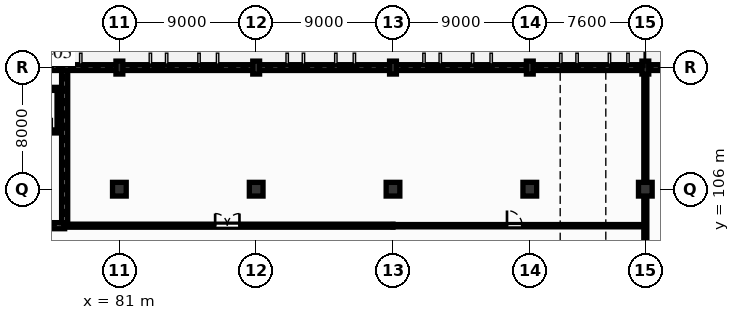
"""IFC4 building model, lengths in metres.
Left out: names, types, materials, properties, quantities, classifications, styles, units other than length and angle.
Written with IfcOpenShell. Run it as: python <this file> out.ifc"""

import sys

from ifc_helpers import new_model, si_unit, direction, frame, frame_2d, origin, origin_2d, place, context, subcontext, project, spatial, rectangle, extrude, element, fill, save


model = new_model("IFC4")
c1 = context("Model", 3, precision=1e-05, world=origin(), true_north=direction((0.0, 1.0)))
c2 = subcontext(c1, "Body", "Model", "MODEL_VIEW")
j1 = project(units=[si_unit("LENGTHUNIT", "METRE"), si_unit("PLANEANGLEUNIT", "RADIAN")], contexts=[c1])
p1 = place(None, origin())
s1 = spatial("IfcSite", under=j1, at=p1, CompositionType="ELEMENT")
p2 = place(p1, origin())
s2 = spatial("IfcBuilding", under=s1, at=p2, CompositionType="ELEMENT")
p3 = place(p2, origin())
s3 = spatial("IfcBuildingStorey", under=s2, at=p3, CompositionType="ELEMENT", Elevation=0.0)
p4 = place(p3, frame((81.0, 106.0, 0.0), z_axis=(0.0, 0.0, 1.0), x_axis=(1.0, 0.0, 0.0)))
e1 = element("IfcColumn", 1, at=p4, inside=s3, PredefinedType="COLUMN", context=c2, shape_type="SweptSolid", body=[
    extrude(rectangle(XDim=0.9, YDim=0.9, at=origin_2d()), origin(), (0.0, 0.0, 1.0), 5.1),
])
p5 = place(p3, frame((81.0, 114.0, 0.0), z_axis=(0.0, 0.0, 1.0), x_axis=(0.0, 1.0, 0.0)))
e2 = element("IfcColumn", 2, at=p5, inside=s3, PredefinedType="COLUMN", context=c2, shape_type="SweptSolid", body=[
    extrude(rectangle(XDim=0.45, YDim=0.85, at=origin_2d()), origin(), (0.0, 0.0, 1.0), 5.1),
])
p6 = place(p3, frame((90.0, 106.0, 0.0), z_axis=(0.0, 0.0, 1.0), x_axis=(1.0, 0.0, 0.0)))
e3 = element("IfcColumn", 3, at=p6, inside=s3, PredefinedType="COLUMN", context=c2, shape_type="SweptSolid", body=[
    extrude(rectangle(XDim=0.9, YDim=0.9, at=origin_2d()), origin(), (0.0, 0.0, 1.0), 5.1),
])
p7 = place(p3, frame((90.0, 114.0, 0.0), z_axis=(0.0, 0.0, 1.0), x_axis=(0.0, 1.0, 0.0)))
e4 = element("IfcColumn", 4, at=p7, inside=s3, PredefinedType="COLUMN", context=c2, shape_type="SweptSolid", body=[
    extrude(rectangle(XDim=0.45, YDim=0.85, at=origin_2d()), origin(), (0.0, 0.0, 1.0), 5.1),
])
p8 = place(p3, frame((99.0, 106.0, 0.0), z_axis=(0.0, 0.0, 1.0), x_axis=(1.0, 0.0, 0.0)))
e5 = element("IfcColumn", 5, at=p8, inside=s3, PredefinedType="COLUMN", context=c2, shape_type="SweptSolid", body=[
    extrude(rectangle(XDim=0.9, YDim=0.9, at=origin_2d()), origin(), (0.0, 0.0, 1.0), 5.1),
])
p9 = place(p3, frame((99.0, 114.0, 0.0), z_axis=(0.0, 0.0, 1.0), x_axis=(0.0, 1.0, 0.0)))
e6 = element("IfcColumn", 6, at=p9, inside=s3, PredefinedType="COLUMN", context=c2, shape_type="SweptSolid", body=[
    extrude(rectangle(XDim=0.45, YDim=0.85, at=origin_2d()), origin(), (0.0, 0.0, 1.0), 5.1),
])
p10 = place(p3, frame((108.0, 106.0, 0.0), z_axis=(0.0, 0.0, 1.0), x_axis=(1.0, 0.0, 0.0)))
e7 = element("IfcColumn", 7, at=p10, inside=s3, PredefinedType="COLUMN", context=c2, shape_type="SweptSolid", body=[
    extrude(rectangle(XDim=0.9, YDim=0.9, at=origin_2d()), origin(), (0.0, 0.0, 1.0), 5.1),
])
p11 = place(p3, frame((108.0, 114.0, 0.0), z_axis=(0.0, 0.0, 1.0), x_axis=(0.0, 1.0, 0.0)))
e8 = element("IfcColumn", 8, at=p11, inside=s3, PredefinedType="COLUMN", context=c2, shape_type="SweptSolid", body=[
    extrude(rectangle(XDim=0.45, YDim=0.85, at=origin_2d()), origin(), (0.0, 0.0, 1.0), 5.1),
])
p12 = place(p3, frame((115.6, 106.0, 0.0), z_axis=(0.0, 0.0, 1.0), x_axis=(1.0, 0.0, 0.0)))
e9 = element("IfcColumn", 9, at=p12, inside=s3, PredefinedType="COLUMN", context=c2, shape_type="SweptSolid", body=[
    extrude(rectangle(XDim=0.9, YDim=0.9, at=origin_2d()), origin(), (0.0, 0.0, 1.0), 5.1),
])
p13 = place(p3, frame((115.6, 114.0, 0.0), z_axis=(0.0, 0.0, 1.0), x_axis=(0.0, 1.0, 0.0)))
e10 = element("IfcColumn", 10, at=p13, inside=s3, PredefinedType="COLUMN", context=c2, shape_type="SweptSolid", body=[
    extrude(rectangle(XDim=0.45, YDim=0.85, at=origin_2d()), origin(), (0.0, 0.0, 1.0), 5.1),
])
p14 = place(p3, frame((72.0, 114.0, 0.0), z_axis=(0.0, 0.0, 1.0), x_axis=(1.0, 0.0, 0.0)))
e11 = element("IfcWall", 11, at=p14, inside=s3, PredefinedType="SOLIDWALL", context=c2, shape_type="SweptSolid", body=[
    extrude(rectangle(XDim=9.0, YDim=0.38, at=frame_2d((4.5, 0.0))), origin(), (0.0, 0.0, 1.0), 4.8),
])
p15 = place(p14, frame((2.2, 0.0, 1.15)))
e12 = element("IfcOpeningElement", 12, at=p15, cuts=e11, PredefinedType="OPENING", context=c2, shape_type="SweptSolid", body=[
    extrude(rectangle(XDim=0.75, YDim=2.2, at=frame_2d((0.375, 1.1))), frame((0.0, 0.2, 0.0), z_axis=(0.0, -1.0, 0.0), x_axis=(1.0, 0.0, 0.0)), (0.0, 0.0, 1.0), 0.4),
])
p16 = place(p3, frame((81.0, 114.0, 0.0), z_axis=(0.0, 0.0, 1.0), x_axis=(1.0, 0.0, 0.0)))
e13 = element("IfcWall", 13, at=p16, inside=s3, PredefinedType="SOLIDWALL", context=c2, shape_type="SweptSolid", body=[
    extrude(rectangle(XDim=9.0, YDim=0.38, at=frame_2d((4.5, 0.0))), origin(), (0.0, 0.0, 1.0), 4.8),
])
p17 = place(p16, frame((2.2, 0.0, 1.15)))
e14 = element("IfcOpeningElement", 14, at=p17, cuts=e13, PredefinedType="OPENING", context=c2, shape_type="SweptSolid", body=[
    extrude(rectangle(XDim=0.75, YDim=2.2, at=frame_2d((0.375, 1.1))), frame((0.0, 0.2, 0.0), z_axis=(0.0, -1.0, 0.0), x_axis=(1.0, 0.0, 0.0)), (0.0, 0.0, 1.0), 0.4),
])
p18 = place(p16, frame((5.4, 0.0, 1.15)))
e15 = element("IfcOpeningElement", 15, at=p18, cuts=e13, PredefinedType="OPENING", context=c2, shape_type="SweptSolid", body=[
    extrude(rectangle(XDim=0.9, YDim=2.2, at=frame_2d((0.45, 1.1))), frame((0.0, 0.2, 0.0), z_axis=(0.0, -1.0, 0.0), x_axis=(1.0, 0.0, 0.0)), (0.0, 0.0, 1.0), 0.4),
])
p19 = place(p3, frame((90.0, 114.0, 0.0), z_axis=(0.0, 0.0, 1.0), x_axis=(1.0, 0.0, 0.0)))
e16 = element("IfcWall", 16, at=p19, inside=s3, PredefinedType="SOLIDWALL", context=c2, shape_type="SweptSolid", body=[
    extrude(rectangle(XDim=9.0, YDim=0.38, at=frame_2d((4.5, 0.0))), origin(), (0.0, 0.0, 1.0), 4.8),
])
p20 = place(p19, frame((2.2, 0.0, 1.15)))
e17 = element("IfcOpeningElement", 17, at=p20, cuts=e16, PredefinedType="OPENING", context=c2, shape_type="SweptSolid", body=[
    extrude(rectangle(XDim=0.75, YDim=2.2, at=frame_2d((0.375, 1.1))), frame((0.0, 0.2, 0.0), z_axis=(0.0, -1.0, 0.0), x_axis=(1.0, 0.0, 0.0)), (0.0, 0.0, 1.0), 0.4),
])
p21 = place(p19, frame((5.4, 0.0, 1.15)))
e18 = element("IfcOpeningElement", 18, at=p21, cuts=e16, PredefinedType="OPENING", context=c2, shape_type="SweptSolid", body=[
    extrude(rectangle(XDim=0.9, YDim=2.2, at=frame_2d((0.45, 1.1))), frame((0.0, 0.2, 0.0), z_axis=(0.0, -1.0, 0.0), x_axis=(1.0, 0.0, 0.0)), (0.0, 0.0, 1.0), 0.4),
])
p22 = place(p3, frame((99.0, 114.0, 0.0), z_axis=(0.0, 0.0, 1.0), x_axis=(1.0, 0.0, 0.0)))
e19 = element("IfcWall", 19, at=p22, inside=s3, PredefinedType="SOLIDWALL", context=c2, shape_type="SweptSolid", body=[
    extrude(rectangle(XDim=9.0, YDim=0.38, at=frame_2d((4.5, 0.0))), origin(), (0.0, 0.0, 1.0), 4.8),
])
p23 = place(p22, frame((2.2, 0.0, 1.15)))
e20 = element("IfcOpeningElement", 20, at=p23, cuts=e19, PredefinedType="OPENING", context=c2, shape_type="SweptSolid", body=[
    extrude(rectangle(XDim=0.75, YDim=2.2, at=frame_2d((0.375, 1.1))), frame((0.0, 0.2, 0.0), z_axis=(0.0, -1.0, 0.0), x_axis=(1.0, 0.0, 0.0)), (0.0, 0.0, 1.0), 0.4),
])
p24 = place(p22, frame((5.4, 0.0, 1.15)))
e21 = element("IfcOpeningElement", 21, at=p24, cuts=e19, PredefinedType="OPENING", context=c2, shape_type="SweptSolid", body=[
    extrude(rectangle(XDim=0.9, YDim=2.2, at=frame_2d((0.45, 1.1))), frame((0.0, 0.2, 0.0), z_axis=(0.0, -1.0, 0.0), x_axis=(1.0, 0.0, 0.0)), (0.0, 0.0, 1.0), 0.4),
])
p25 = place(p3, frame((108.0, 114.0, 0.0), z_axis=(0.0, 0.0, 1.0), x_axis=(1.0, 0.0, 0.0)))
e22 = element("IfcWall", 22, at=p25, inside=s3, PredefinedType="SOLIDWALL", context=c2, shape_type="SweptSolid", body=[
    extrude(rectangle(XDim=7.6, YDim=0.38, at=frame_2d((3.8, 0.0))), origin(), (0.0, 0.0, 1.0), 4.8),
])
p26 = place(p25, frame((2.2, 0.0, 1.15)))
e23 = element("IfcOpeningElement", 23, at=p26, cuts=e22, PredefinedType="OPENING", context=c2, shape_type="SweptSolid", body=[
    extrude(rectangle(XDim=0.75, YDim=2.2, at=frame_2d((0.375, 1.1))), frame((0.0, 0.2, 0.0), z_axis=(0.0, -1.0, 0.0), x_axis=(1.0, 0.0, 0.0)), (0.0, 0.0, 1.0), 0.4),
])
p27 = place(p25, frame((5.4, 0.0, 1.15)))
e24 = element("IfcOpeningElement", 24, at=p27, cuts=e22, PredefinedType="OPENING", context=c2, shape_type="SweptSolid", body=[
    extrude(rectangle(XDim=0.9, YDim=2.2, at=frame_2d((0.45, 1.1))), frame((0.0, 0.2, 0.0), z_axis=(0.0, -1.0, 0.0), x_axis=(1.0, 0.0, 0.0)), (0.0, 0.0, 1.0), 0.4),
])
p28 = place(p3, frame((115.6, 114.0, 0.0), z_axis=(0.0, 0.0, 1.0), x_axis=(1.0, 0.0, 0.0)))
e25 = element("IfcWall", 25, at=p28, inside=s3, PredefinedType="SOLIDWALL", context=c2, shape_type="SweptSolid", body=[
    extrude(rectangle(XDim=30.4, YDim=0.38, at=frame_2d((15.2, 0.0))), origin(), (0.0, 0.0, 1.0), 4.8),
])
p29 = place(p28, frame((1.95, 0.0, 0.0)))
e26 = element("IfcOpeningElement", 26, at=p29, cuts=e25, PredefinedType="OPENING", context=c2, shape_type="SweptSolid", body=[
    extrude(rectangle(XDim=3.7, YDim=4.0, at=frame_2d((1.85, 2.0))), frame((0.0, 0.2, 0.0), z_axis=(0.0, -1.0, 0.0), x_axis=(1.0, 0.0, 0.0)), (0.0, 0.0, 1.0), 0.4),
])
p30 = place(p28, frame((9.55, 0.0, 0.0)))
e27 = element("IfcOpeningElement", 27, at=p30, cuts=e25, PredefinedType="OPENING", context=c2, shape_type="SweptSolid", body=[
    extrude(rectangle(XDim=3.7, YDim=4.0, at=frame_2d((1.85, 2.0))), frame((0.0, 0.2, 0.0), z_axis=(0.0, -1.0, 0.0), x_axis=(1.0, 0.0, 0.0)), (0.0, 0.0, 1.0), 0.4),
])
p31 = place(p28, frame((17.15, 0.0, 0.0)))
e28 = element("IfcOpeningElement", 28, at=p31, cuts=e25, PredefinedType="OPENING", context=c2, shape_type="SweptSolid", body=[
    extrude(rectangle(XDim=3.7, YDim=4.0, at=frame_2d((1.85, 2.0))), frame((0.0, 0.2, 0.0), z_axis=(0.0, -1.0, 0.0), x_axis=(1.0, 0.0, 0.0)), (0.0, 0.0, 1.0), 0.4),
])
p32 = place(p28, frame((24.75, 0.0, 0.0)))
e29 = element("IfcOpeningElement", 29, at=p32, cuts=e25, PredefinedType="OPENING", context=c2, shape_type="SweptSolid", body=[
    extrude(rectangle(XDim=3.7, YDim=4.0, at=frame_2d((1.85, 2.0))), frame((0.0, 0.2, 0.0), z_axis=(0.0, -1.0, 0.0), x_axis=(1.0, 0.0, 0.0)), (0.0, 0.0, 1.0), 0.4),
])
p33 = place(p3, frame((64.2, 103.6, 0.0), z_axis=(0.0, 0.0, 1.0), x_axis=(1.0, 0.0, 0.0)))
e30 = element("IfcWall", 30, at=p33, inside=s3, PredefinedType="SHEAR", context=c2, shape_type="SweptSolid", body=[
    extrude(rectangle(XDim=13.2, YDim=0.4, at=frame_2d((6.6, 0.0))), origin(), (0.0, 0.0, 1.0), 4.8),
])
p34 = place(p33, frame((5.8, 0.0, 0.0)))
e31 = element("IfcOpeningElement", 31, at=p34, cuts=e30, PredefinedType="OPENING", context=c2, shape_type="SweptSolid", body=[
    extrude(rectangle(XDim=1.5, YDim=2.2, at=frame_2d((0.75, 1.1))), frame((0.0, 0.21, 0.0), z_axis=(0.0, -1.0, 0.0), x_axis=(1.0, 0.0, 0.0)), (0.0, 0.0, 1.0), 0.42),
])
p35 = place(p3, frame((77.4, 103.8, 0.0), z_axis=(0.0, 0.0, 1.0), x_axis=(0.0, 1.0, 0.0)))
e32 = element("IfcWall", 32, at=p35, inside=s3, PredefinedType="SHEAR", context=c2, shape_type="SweptSolid", body=[
    extrude(rectangle(XDim=10.01, YDim=0.4, at=frame_2d((5.005, 0.0))), origin(), (0.0, 0.0, 1.0), 4.8),
])
p36 = place(p3, frame((75.2, 109.8, 0.0), z_axis=(0.0, 0.0, 1.0), x_axis=(1.0, 0.0, 0.0)))
e33 = element("IfcWall", 33, at=p36, inside=s3, PredefinedType="PARTITIONING", context=c2, shape_type="SweptSolid", body=[
    extrude(rectangle(XDim=1.8, YDim=0.2, at=frame_2d((0.9, 0.0))), origin(), (0.0, 0.0, 1.0), 4.8),
])
p37 = place(p36, frame((0.45, 0.0, 0.0)))
e34 = element("IfcOpeningElement", 34, at=p37, cuts=e33, PredefinedType="OPENING", context=c2, shape_type="SweptSolid", body=[
    extrude(rectangle(XDim=0.9, YDim=2.1, at=frame_2d((0.45, 1.05))), frame((0.0, 0.11, 0.0), z_axis=(0.0, -1.0, 0.0), x_axis=(1.0, 0.0, 0.0)), (0.0, 0.0, 1.0), 0.22),
])
p38 = place(p3, frame((75.2, 112.6, 0.0), z_axis=(0.0, 0.0, 1.0), x_axis=(1.0, 0.0, 0.0)))
e35 = element("IfcWall", 35, at=p38, inside=s3, PredefinedType="PARTITIONING", context=c2, shape_type="SweptSolid", body=[
    extrude(rectangle(XDim=1.8, YDim=0.2, at=frame_2d((0.9, 0.0))), origin(), (0.0, 0.0, 1.0), 4.8),
])
p39 = place(p3, frame((77.0, 110.0, 0.0), z_axis=(0.0, 0.0, 1.0), x_axis=(0.0, 1.0, 0.0)))
e36 = element("IfcWall", 36, at=p39, inside=s3, PredefinedType="PARTITIONING", context=c2, shape_type="SweptSolid", body=[
    extrude(rectangle(XDim=2.4, YDim=0.2, at=frame_2d((1.2, 0.0))), origin(), (0.0, 0.0, 1.0), 4.8),
])
p40 = place(p3, frame((77.4, 103.6, 0.0), z_axis=(0.0, 0.0, 1.0), x_axis=(1.0, 0.0, 0.0)))
e37 = element("IfcWall", 37, at=p40, inside=s3, PredefinedType="PARTITIONING", context=c2, shape_type="SweptSolid", body=[
    extrude(rectangle(XDim=21.6, YDim=0.2, at=frame_2d((10.8, 0.0))), origin(), (0.0, 0.0, 1.0), 4.8),
])
p41 = place(p40, frame((9.9, 0.0, 0.0)))
e38 = element("IfcOpeningElement", 38, at=p41, cuts=e37, PredefinedType="OPENING", context=c2, shape_type="SweptSolid", body=[
    extrude(rectangle(XDim=1.6, YDim=2.2, at=frame_2d((0.8, 1.1))), frame((0.0, 0.11, 0.0), z_axis=(0.0, -1.0, 0.0), x_axis=(1.0, 0.0, 0.0)), (0.0, 0.0, 1.0), 0.22),
])
p42 = place(p3, frame((99.0, 103.6, 0.0), z_axis=(0.0, 0.0, 1.0), x_axis=(1.0, 0.0, 0.0)))
e39 = element("IfcWall", 39, at=p42, inside=s3, PredefinedType="PARTITIONING", context=c2, shape_type="SweptSolid", body=[
    extrude(rectangle(XDim=16.6, YDim=0.15, at=frame_2d((8.3, 0.0))), origin(), (0.0, 0.0, 1.0), 4.8),
])
p43 = place(p42, frame((7.5, 0.0, 0.0)))
e40 = element("IfcOpeningElement", 40, at=p43, cuts=e39, PredefinedType="OPENING", context=c2, shape_type="SweptSolid", body=[
    extrude(rectangle(XDim=1.0, YDim=2.15, at=frame_2d((0.5, 1.075))), frame((0.0, 0.085, 0.0), z_axis=(0.0, -1.0, 0.0), x_axis=(1.0, 0.0, 0.0)), (0.0, 0.0, 1.0), 0.17),
])
p44 = place(p3, frame((115.6, 82.2, 0.0), z_axis=(0.0, 0.0, 1.0), x_axis=(0.0, 1.0, 0.0)))
e41 = element("IfcWall", 41, at=p44, inside=s3, PredefinedType="PARTITIONING", context=c2, shape_type="SweptSolid", body=[
    extrude(rectangle(XDim=31.8, YDim=0.2, at=frame_2d((15.9, 0.0))), origin(), (0.0, 0.0, 1.0), 4.045),
])
p45 = place(p44, frame((18.0, 0.0, 0.0)))
e42 = element("IfcOpeningElement", 42, at=p45, cuts=e41, PredefinedType="OPENING", context=c2, shape_type="SweptSolid", body=[
    extrude(rectangle(XDim=1.6, YDim=2.2, at=frame_2d((0.8, 1.1))), frame((0.0, 0.11, 0.0), z_axis=(0.0, -1.0, 0.0), x_axis=(1.0, 0.0, 0.0)), (0.0, 0.0, 1.0), 0.22),
])
p46 = place(p17, origin())
e43 = element("IfcWindow", 43, at=p46, inside=s3, PartitioningType="SINGLE_PANEL", PredefinedType="WINDOW", context=c2, shape_type="SweptSolid", body=[
    extrude(rectangle(XDim=0.75, YDim=2.2, at=frame_2d((0.375, 1.1))), frame((0.0, 0.03, 0.0), z_axis=(0.0, -1.0, 0.0), x_axis=(1.0, 0.0, 0.0)), (0.0, 0.0, 1.0), 0.06),
])
fill(e14, e43)
p47 = place(p18, origin())
e44 = element("IfcWindow", 44, at=p47, inside=s3, PartitioningType="SINGLE_PANEL", PredefinedType="WINDOW", context=c2, shape_type="SweptSolid", body=[
    extrude(rectangle(XDim=0.9, YDim=2.2, at=frame_2d((0.45, 1.1))), frame((0.0, 0.03, 0.0), z_axis=(0.0, -1.0, 0.0), x_axis=(1.0, 0.0, 0.0)), (0.0, 0.0, 1.0), 0.06),
])
fill(e15, e44)
p48 = place(p20, origin())
e45 = element("IfcWindow", 45, at=p48, inside=s3, PartitioningType="SINGLE_PANEL", PredefinedType="WINDOW", context=c2, shape_type="SweptSolid", body=[
    extrude(rectangle(XDim=0.75, YDim=2.2, at=frame_2d((0.375, 1.1))), frame((0.0, 0.03, 0.0), z_axis=(0.0, -1.0, 0.0), x_axis=(1.0, 0.0, 0.0)), (0.0, 0.0, 1.0), 0.06),
])
fill(e17, e45)
p49 = place(p21, origin())
e46 = element("IfcWindow", 46, at=p49, inside=s3, PartitioningType="SINGLE_PANEL", PredefinedType="WINDOW", context=c2, shape_type="SweptSolid", body=[
    extrude(rectangle(XDim=0.9, YDim=2.2, at=frame_2d((0.45, 1.1))), frame((0.0, 0.03, 0.0), z_axis=(0.0, -1.0, 0.0), x_axis=(1.0, 0.0, 0.0)), (0.0, 0.0, 1.0), 0.06),
])
fill(e18, e46)
p50 = place(p23, origin())
e47 = element("IfcWindow", 47, at=p50, inside=s3, PartitioningType="SINGLE_PANEL", PredefinedType="WINDOW", context=c2, shape_type="SweptSolid", body=[
    extrude(rectangle(XDim=0.75, YDim=2.2, at=frame_2d((0.375, 1.1))), frame((0.0, 0.03, 0.0), z_axis=(0.0, -1.0, 0.0), x_axis=(1.0, 0.0, 0.0)), (0.0, 0.0, 1.0), 0.06),
])
fill(e20, e47)
p51 = place(p24, origin())
e48 = element("IfcWindow", 48, at=p51, inside=s3, PartitioningType="SINGLE_PANEL", PredefinedType="WINDOW", context=c2, shape_type="SweptSolid", body=[
    extrude(rectangle(XDim=0.9, YDim=2.2, at=frame_2d((0.45, 1.1))), frame((0.0, 0.03, 0.0), z_axis=(0.0, -1.0, 0.0), x_axis=(1.0, 0.0, 0.0)), (0.0, 0.0, 1.0), 0.06),
])
fill(e21, e48)
p52 = place(p26, origin())
e49 = element("IfcWindow", 49, at=p52, inside=s3, PartitioningType="SINGLE_PANEL", PredefinedType="WINDOW", context=c2, shape_type="SweptSolid", body=[
    extrude(rectangle(XDim=0.75, YDim=2.2, at=frame_2d((0.375, 1.1))), frame((0.0, 0.03, 0.0), z_axis=(0.0, -1.0, 0.0), x_axis=(1.0, 0.0, 0.0)), (0.0, 0.0, 1.0), 0.06),
])
fill(e23, e49)
p53 = place(p27, origin())
e50 = element("IfcWindow", 50, at=p53, inside=s3, PartitioningType="SINGLE_PANEL", PredefinedType="WINDOW", context=c2, shape_type="SweptSolid", body=[
    extrude(rectangle(XDim=0.9, YDim=2.2, at=frame_2d((0.45, 1.1))), frame((0.0, 0.03, 0.0), z_axis=(0.0, -1.0, 0.0), x_axis=(1.0, 0.0, 0.0)), (0.0, 0.0, 1.0), 0.06),
])
fill(e24, e50)
p54 = place(p41, origin())
e51 = element("IfcDoor", 51, at=p54, inside=s3, OperationType="DOUBLE_DOOR_SINGLE_SWING", PredefinedType="DOOR", context=c2, shape_type="SweptSolid", body=[
    extrude(rectangle(XDim=1.6, YDim=2.2, at=frame_2d((0.8, 1.1))), frame((0.0, 0.025, 0.0), z_axis=(0.0, -1.0, 0.0), x_axis=(1.0, 0.0, 0.0)), (0.0, 0.0, 1.0), 0.05),
])
fill(e38, e51)
p55 = place(p43, origin())
e52 = element("IfcDoor", 52, at=p55, inside=s3, OperationType="SINGLE_SWING_LEFT", PredefinedType="DOOR", context=c2, shape_type="SweptSolid", body=[
    extrude(rectangle(XDim=1.0, YDim=2.15, at=frame_2d((0.5, 1.075))), frame((0.0, 0.025, 0.0), z_axis=(0.0, -1.0, 0.0), x_axis=(1.0, 0.0, 0.0)), (0.0, 0.0, 1.0), 0.05),
])
fill(e40, e52)
save(model, sys.argv[1])
